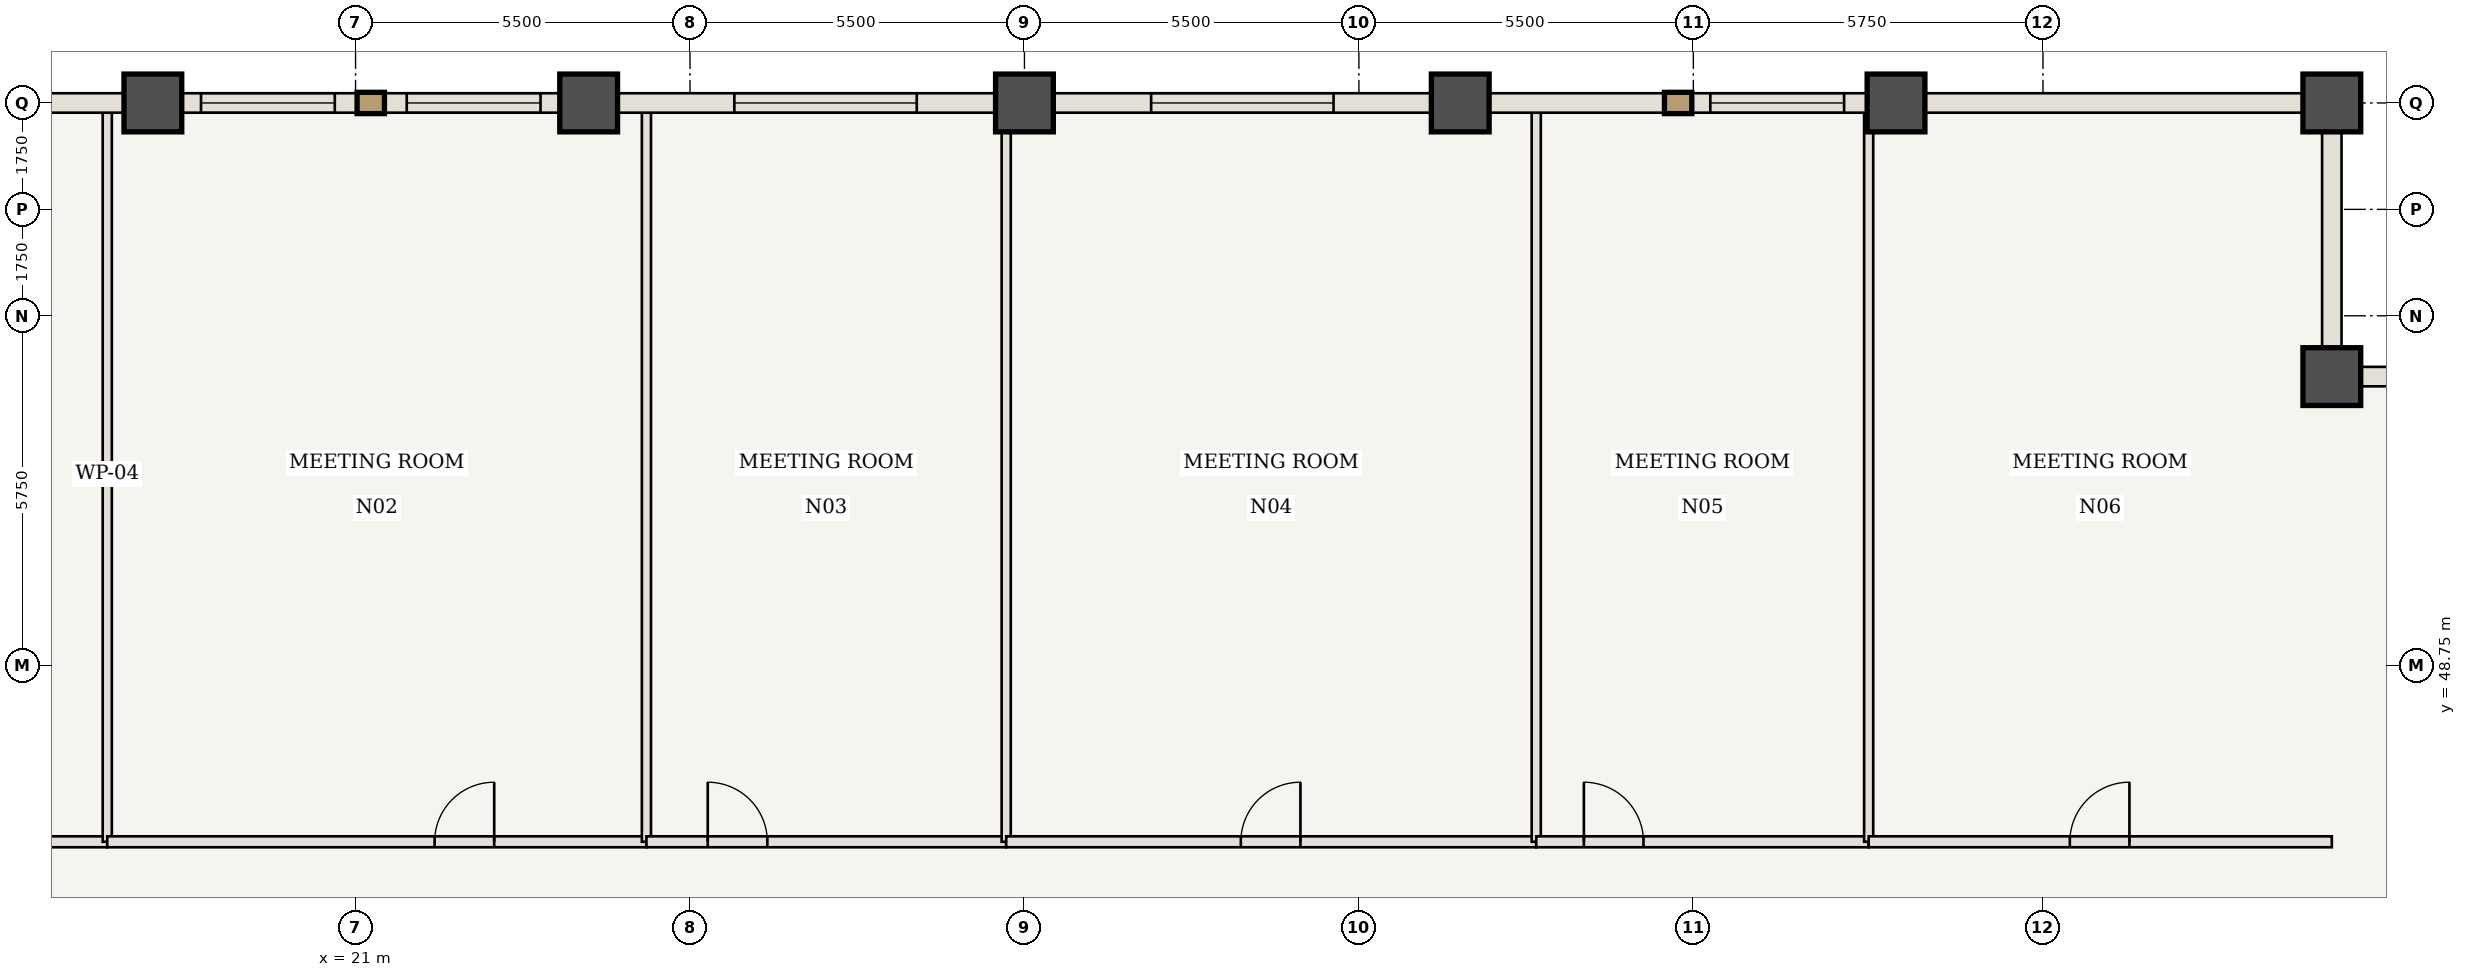
"""IFC4 building model, lengths in metres.
Left out: names, types, materials, properties, quantities, classifications, styles, units other than length and angle.
Written with IfcOpenShell. Run it as: python <this file> out.ifc"""

import sys

from ifc_helpers import new_model, si_unit, direction, frame, frame_2d, origin, origin_2d, place, context, subcontext, project, spatial, rectangle, extrude, element, fill, save


model = new_model("IFC4")
c1 = context("Model", 3, precision=1e-05, world=origin(), true_north=direction((0.0, 1.0)))
c2 = subcontext(c1, "Body", "Model", "MODEL_VIEW")
j1 = project(units=[si_unit("LENGTHUNIT", "METRE"), si_unit("PLANEANGLEUNIT", "RADIAN")], contexts=[c1])
p1 = place(None, origin())
s1 = spatial("IfcSite", under=j1, at=p1, CompositionType="ELEMENT")
p2 = place(p1, origin())
s2 = spatial("IfcBuilding", under=s1, at=p2, CompositionType="ELEMENT")
p3 = place(p2, frame((0.0, 0.0, 172.2)))
s3 = spatial("IfcBuildingStorey", under=s2, at=p3, CompositionType="ELEMENT", Elevation=172.2)
for number, where, z_axis, x_axis in (
    (1, (53.5, 53.5, 0.0), (0.0, 0.0, 1.0), (1.0, 0.0, 0.0)),
    (2, (53.5, 58.0, 0.0), (0.0, 0.0, 1.0), (1.0, 0.0, 0.0)),
    (3, (17.667, 58.0, 0.0), (0.0, 0.0, 1.0), (1.0, 0.0, 0.0)),
    (4, (24.833, 58.0, 0.0), (0.0, 0.0, 1.0), (1.0, 0.0, 0.0)),
    (5, (32.0, 58.0, 0.0), (0.0, 0.0, 1.0), (1.0, 0.0, 0.0)),
    (6, (39.167, 58.0, 0.0), (0.0, 0.0, 1.0), (1.0, 0.0, 0.0)),
    (7, (46.333, 58.0, 0.0), (0.0, 0.0, 1.0), (1.0, 0.0, 0.0)),
):
    element("IfcColumn", number, at=place(p3, frame(where, z_axis=z_axis, x_axis=x_axis)), inside=s3, PredefinedType="COLUMN", context=c2, shape_type="SweptSolid", body=[
        extrude(rectangle(XDim=0.95, YDim=0.95, at=origin_2d()), origin(), (0.0, 0.0, 1.0), 3.85),
    ])
p4 = place(p3, frame((10.5, 45.85, 0.0), z_axis=(0.0, 0.0, 1.0), x_axis=(1.0, 0.0, 0.0)))
e8 = element("IfcWall", 8, at=p4, inside=s3, PredefinedType="STANDARD", context=c2, shape_type="SweptSolid", body=[
    extrude(rectangle(XDim=6.417, YDim=0.18, at=frame_2d((3.208, 0.0))), origin(), (0.0, 0.0, 1.0), 3.43),
])
p5 = place(p4, frame((2.708, 0.0, 0.0)))
e9 = element("IfcOpeningElement", 9, at=p5, cuts=e8, PredefinedType="OPENING", context=c2, shape_type="SweptSolid", body=[
    extrude(rectangle(XDim=0.98, YDim=2.2, at=frame_2d((0.49, 1.1))), frame((0.0, 0.1, 0.0), z_axis=(0.0, -1.0, 0.0), x_axis=(1.0, 0.0, 0.0)), (0.0, 0.0, 1.0), 0.2),
])
p6 = place(p3, frame((16.917, 45.85, 0.0), z_axis=(0.0, 0.0, 1.0), x_axis=(0.0, 1.0, 0.0)))
e10 = element("IfcWall", 10, at=p6, inside=s3, PredefinedType="STANDARD", context=c2, shape_type="SweptSolid", body=[
    extrude(rectangle(XDim=12.09, YDim=0.15, at=frame_2d((6.045, 0.0))), origin(), (0.0, 0.0, 1.0), 3.43),
])
p7 = place(p3, frame((16.917, 45.85, 0.0), z_axis=(0.0, 0.0, 1.0), x_axis=(1.0, 0.0, 0.0)))
e11 = element("IfcWall", 11, at=p7, inside=s3, PredefinedType="STANDARD", context=c2, shape_type="SweptSolid", body=[
    extrude(rectangle(XDim=8.866, YDim=0.18, at=frame_2d((4.433, 0.0))), origin(), (0.0, 0.0, 1.0), 3.43),
])
p8 = place(p7, frame((5.383, 0.0, 0.0)))
e12 = element("IfcOpeningElement", 12, at=p8, cuts=e11, PredefinedType="OPENING", context=c2, shape_type="SweptSolid", body=[
    extrude(rectangle(XDim=0.98, YDim=2.2, at=frame_2d((0.49, 1.1))), frame((0.0, 0.1, 0.0), z_axis=(0.0, -1.0, 0.0), x_axis=(1.0, 0.0, 0.0)), (0.0, 0.0, 1.0), 0.2),
])
p9 = place(p3, frame((25.783, 45.85, 0.0), z_axis=(0.0, 0.0, 1.0), x_axis=(0.0, 1.0, 0.0)))
e13 = element("IfcWall", 13, at=p9, inside=s3, PredefinedType="STANDARD", context=c2, shape_type="SweptSolid", body=[
    extrude(rectangle(XDim=12.09, YDim=0.15, at=frame_2d((6.045, 0.0))), origin(), (0.0, 0.0, 1.0), 3.43),
])
p10 = place(p3, frame((25.783, 45.85, 0.0), z_axis=(0.0, 0.0, 1.0), x_axis=(1.0, 0.0, 0.0)))
e14 = element("IfcWall", 14, at=p10, inside=s3, PredefinedType="STANDARD", context=c2, shape_type="SweptSolid", body=[
    extrude(rectangle(XDim=5.917, YDim=0.18, at=frame_2d((2.958, 0.0))), origin(), (0.0, 0.0, 1.0), 3.43),
])
p11 = place(p10, frame((1.008, 0.0, 0.0)))
e15 = element("IfcOpeningElement", 15, at=p11, cuts=e14, PredefinedType="OPENING", context=c2, shape_type="SweptSolid", body=[
    extrude(rectangle(XDim=0.98, YDim=2.2, at=frame_2d((0.49, 1.1))), frame((0.0, 0.1, 0.0), z_axis=(0.0, -1.0, 0.0), x_axis=(1.0, 0.0, 0.0)), (0.0, 0.0, 1.0), 0.2),
])
p12 = place(p3, frame((31.7, 45.85, 0.0), z_axis=(0.0, 0.0, 1.0), x_axis=(0.0, 1.0, 0.0)))
e16 = element("IfcWall", 16, at=p12, inside=s3, PredefinedType="STANDARD", context=c2, shape_type="SweptSolid", body=[
    extrude(rectangle(XDim=12.09, YDim=0.15, at=frame_2d((6.045, 0.0))), origin(), (0.0, 0.0, 1.0), 3.43),
])
p13 = place(p3, frame((31.7, 45.85, 0.0), z_axis=(0.0, 0.0, 1.0), x_axis=(1.0, 0.0, 0.0)))
e17 = element("IfcWall", 17, at=p13, inside=s3, PredefinedType="STANDARD", context=c2, shape_type="SweptSolid", body=[
    extrude(rectangle(XDim=8.717, YDim=0.18, at=frame_2d((4.358, 0.0))), origin(), (0.0, 0.0, 1.0), 3.43),
])
p14 = place(p13, frame((3.858, 0.0, 0.0)))
e18 = element("IfcOpeningElement", 18, at=p14, cuts=e17, PredefinedType="OPENING", context=c2, shape_type="SweptSolid", body=[
    extrude(rectangle(XDim=0.98, YDim=2.2, at=frame_2d((0.49, 1.1))), frame((0.0, 0.1, 0.0), z_axis=(0.0, -1.0, 0.0), x_axis=(1.0, 0.0, 0.0)), (0.0, 0.0, 1.0), 0.2),
])
p15 = place(p3, frame((40.417, 45.85, 0.0), z_axis=(0.0, 0.0, 1.0), x_axis=(0.0, 1.0, 0.0)))
e19 = element("IfcWall", 19, at=p15, inside=s3, PredefinedType="STANDARD", context=c2, shape_type="SweptSolid", body=[
    extrude(rectangle(XDim=12.09, YDim=0.15, at=frame_2d((6.045, 0.0))), origin(), (0.0, 0.0, 1.0), 3.43),
])
p16 = place(p3, frame((40.417, 45.85, 0.0), z_axis=(0.0, 0.0, 1.0), x_axis=(1.0, 0.0, 0.0)))
e20 = element("IfcWall", 20, at=p16, inside=s3, PredefinedType="STANDARD", context=c2, shape_type="SweptSolid", body=[
    extrude(rectangle(XDim=5.467, YDim=0.18, at=frame_2d((2.733, 0.0))), origin(), (0.0, 0.0, 1.0), 3.43),
])
p17 = place(p16, frame((0.783, 0.0, 0.0)))
e21 = element("IfcOpeningElement", 21, at=p17, cuts=e20, PredefinedType="OPENING", context=c2, shape_type="SweptSolid", body=[
    extrude(rectangle(XDim=0.98, YDim=2.2, at=frame_2d((0.49, 1.1))), frame((0.0, 0.1, 0.0), z_axis=(0.0, -1.0, 0.0), x_axis=(1.0, 0.0, 0.0)), (0.0, 0.0, 1.0), 0.2),
])
p18 = place(p3, frame((45.883, 45.85, 0.0), z_axis=(0.0, 0.0, 1.0), x_axis=(0.0, 1.0, 0.0)))
e22 = element("IfcWall", 22, at=p18, inside=s3, PredefinedType="STANDARD", context=c2, shape_type="SweptSolid", body=[
    extrude(rectangle(XDim=12.09, YDim=0.15, at=frame_2d((6.045, 0.0))), origin(), (0.0, 0.0, 1.0), 3.43),
])
p19 = place(p3, frame((45.883, 45.85, 0.0), z_axis=(0.0, 0.0, 1.0), x_axis=(1.0, 0.0, 0.0)))
e23 = element("IfcWall", 23, at=p19, inside=s3, PredefinedType="STANDARD", context=c2, shape_type="SweptSolid", body=[
    extrude(rectangle(XDim=7.617, YDim=0.18, at=frame_2d((3.808, 0.0))), origin(), (0.0, 0.0, 1.0), 3.43),
])
p20 = place(p19, frame((3.308, 0.0, 0.0)))
e24 = element("IfcOpeningElement", 24, at=p20, cuts=e23, PredefinedType="OPENING", context=c2, shape_type="SweptSolid", body=[
    extrude(rectangle(XDim=0.98, YDim=2.2, at=frame_2d((0.49, 1.1))), frame((0.0, 0.1, 0.0), z_axis=(0.0, -1.0, 0.0), x_axis=(1.0, 0.0, 0.0)), (0.0, 0.0, 1.0), 0.2),
])
p21 = place(p3, frame((10.5, 58.0, 0.0), z_axis=(0.0, 0.0, 1.0), x_axis=(1.0, 0.0, 0.0)))
e25 = element("IfcWall", 25, at=p21, inside=s3, PredefinedType="USERDEFINED", context=c2, shape_type="SweptSolid", body=[
    extrude(rectangle(XDim=7.167, YDim=0.32, at=frame_2d((3.583, 0.0))), origin(), (0.0, 0.0, 1.0), 2.63),
])
p22 = place(p3, frame((17.667, 58.0, 0.0), z_axis=(0.0, 0.0, 1.0), x_axis=(1.0, 0.0, 0.0)))
e26 = element("IfcWall", 26, at=p22, inside=s3, PredefinedType="USERDEFINED", context=c2, shape_type="SweptSolid", body=[
    extrude(rectangle(XDim=7.167, YDim=0.32, at=frame_2d((3.583, 0.0))), origin(), (0.0, 0.0, 1.0), 2.63),
])
p23 = place(p22, frame((0.792, 0.0, 0.85)))
e27 = element("IfcOpeningElement", 27, at=p23, cuts=e26, PredefinedType="OPENING", context=c2, shape_type="SweptSolid", body=[
    extrude(rectangle(XDim=2.2, YDim=1.58, at=frame_2d((1.1, 0.79))), frame((0.0, 0.17, 0.0), z_axis=(0.0, -1.0, 0.0), x_axis=(1.0, 0.0, 0.0)), (0.0, 0.0, 1.0), 0.34),
])
p24 = place(p22, frame((4.175, 0.0, 0.85)))
e28 = element("IfcOpeningElement", 28, at=p24, cuts=e26, PredefinedType="OPENING", context=c2, shape_type="SweptSolid", body=[
    extrude(rectangle(XDim=2.2, YDim=1.58, at=frame_2d((1.1, 0.79))), frame((0.0, 0.17, 0.0), z_axis=(0.0, -1.0, 0.0), x_axis=(1.0, 0.0, 0.0)), (0.0, 0.0, 1.0), 0.34),
])
p25 = place(p3, frame((24.833, 58.0, 0.0), z_axis=(0.0, 0.0, 1.0), x_axis=(1.0, 0.0, 0.0)))
e29 = element("IfcWall", 29, at=p25, inside=s3, PredefinedType="USERDEFINED", context=c2, shape_type="SweptSolid", body=[
    extrude(rectangle(XDim=7.167, YDim=0.32, at=frame_2d((3.583, 0.0))), origin(), (0.0, 0.0, 1.0), 2.63),
])
p26 = place(p25, frame((2.396, 0.0, 0.85)))
e30 = element("IfcOpeningElement", 30, at=p26, cuts=e29, PredefinedType="OPENING", context=c2, shape_type="SweptSolid", body=[
    extrude(rectangle(XDim=3.0, YDim=1.58, at=frame_2d((1.5, 0.79))), frame((0.0, 0.17, 0.0), z_axis=(0.0, -1.0, 0.0), x_axis=(1.0, 0.0, 0.0)), (0.0, 0.0, 1.0), 0.34),
])
p27 = place(p3, frame((32.0, 58.0, 0.0), z_axis=(0.0, 0.0, 1.0), x_axis=(1.0, 0.0, 0.0)))
e31 = element("IfcWall", 31, at=p27, inside=s3, PredefinedType="USERDEFINED", context=c2, shape_type="SweptSolid", body=[
    extrude(rectangle(XDim=7.167, YDim=0.32, at=frame_2d((3.583, 0.0))), origin(), (0.0, 0.0, 1.0), 2.63),
])
p28 = place(p27, frame((2.083, 0.0, 0.85)))
e32 = element("IfcOpeningElement", 32, at=p28, cuts=e31, PredefinedType="OPENING", context=c2, shape_type="SweptSolid", body=[
    extrude(rectangle(XDim=3.0, YDim=1.58, at=frame_2d((1.5, 0.79))), frame((0.0, 0.17, 0.0), z_axis=(0.0, -1.0, 0.0), x_axis=(1.0, 0.0, 0.0)), (0.0, 0.0, 1.0), 0.34),
])
p29 = place(p3, frame((39.167, 58.0, 0.0), z_axis=(0.0, 0.0, 1.0), x_axis=(1.0, 0.0, 0.0)))
e33 = element("IfcWall", 33, at=p29, inside=s3, PredefinedType="USERDEFINED", context=c2, shape_type="SweptSolid", body=[
    extrude(rectangle(XDim=7.167, YDim=0.32, at=frame_2d((3.583, 0.0))), origin(), (0.0, 0.0, 1.0), 2.63),
])
p30 = place(p29, frame((4.113, 0.0, 0.85)))
e34 = element("IfcOpeningElement", 34, at=p30, cuts=e33, PredefinedType="OPENING", context=c2, shape_type="SweptSolid", body=[
    extrude(rectangle(XDim=2.2, YDim=1.58, at=frame_2d((1.1, 0.79))), frame((0.0, 0.17, 0.0), z_axis=(0.0, -1.0, 0.0), x_axis=(1.0, 0.0, 0.0)), (0.0, 0.0, 1.0), 0.34),
])
p31 = place(p3, frame((46.333, 58.0, 0.0), z_axis=(0.0, 0.0, 1.0), x_axis=(1.0, 0.0, 0.0)))
e35 = element("IfcWall", 35, at=p31, inside=s3, PredefinedType="USERDEFINED", context=c2, shape_type="SweptSolid", body=[
    extrude(rectangle(XDim=7.167, YDim=0.32, at=frame_2d((3.583, 0.0))), origin(), (0.0, 0.0, 1.0), 2.63),
])
for number, where, z_axis, x_axis in (
    (36, (53.5, 53.5, 0.0), (0.0, 0.0, 1.0), (1.0, 0.0, 0.0)),
    (37, (53.5, 58.0, 0.0), (0.0, 0.0, 1.0), (0.0, -1.0, 0.0)),
):
    element("IfcWall", number, at=place(p3, frame(where, z_axis=z_axis, x_axis=x_axis)), inside=s3, PredefinedType="USERDEFINED", context=c2, shape_type="SweptSolid", body=[
        extrude(rectangle(XDim=4.5, YDim=0.32, at=frame_2d((2.25, 0.0))), origin(), (0.0, 0.0, 1.0), 2.63),
    ])
p32 = place(p8, origin())
e38 = element("IfcDoor", 38, at=p32, inside=s3, OperationType="SINGLE_SWING_RIGHT", PredefinedType="DOOR", context=c2, shape_type="SweptSolid", body=[
    extrude(rectangle(XDim=0.98, YDim=2.2, at=frame_2d((0.49, 1.1))), frame((0.0, 0.025, 0.0), z_axis=(0.0, -1.0, 0.0), x_axis=(1.0, 0.0, 0.0)), (0.0, 0.0, 1.0), 0.05),
])
fill(e12, e38)
p33 = place(p11, origin())
e39 = element("IfcDoor", 39, at=p33, inside=s3, OperationType="SINGLE_SWING_LEFT", PredefinedType="DOOR", context=c2, shape_type="SweptSolid", body=[
    extrude(rectangle(XDim=0.98, YDim=2.2, at=frame_2d((0.49, 1.1))), frame((0.0, 0.025, 0.0), z_axis=(0.0, -1.0, 0.0), x_axis=(1.0, 0.0, 0.0)), (0.0, 0.0, 1.0), 0.05),
])
fill(e15, e39)
p34 = place(p14, origin())
e40 = element("IfcDoor", 40, at=p34, inside=s3, OperationType="SINGLE_SWING_RIGHT", PredefinedType="DOOR", context=c2, shape_type="SweptSolid", body=[
    extrude(rectangle(XDim=0.98, YDim=2.2, at=frame_2d((0.49, 1.1))), frame((0.0, 0.025, 0.0), z_axis=(0.0, -1.0, 0.0), x_axis=(1.0, 0.0, 0.0)), (0.0, 0.0, 1.0), 0.05),
])
fill(e18, e40)
p35 = place(p17, origin())
e41 = element("IfcDoor", 41, at=p35, inside=s3, OperationType="SINGLE_SWING_LEFT", PredefinedType="DOOR", context=c2, shape_type="SweptSolid", body=[
    extrude(rectangle(XDim=0.98, YDim=2.2, at=frame_2d((0.49, 1.1))), frame((0.0, 0.025, 0.0), z_axis=(0.0, -1.0, 0.0), x_axis=(1.0, 0.0, 0.0)), (0.0, 0.0, 1.0), 0.05),
])
fill(e21, e41)
p36 = place(p20, origin())
e42 = element("IfcDoor", 42, at=p36, inside=s3, OperationType="SINGLE_SWING_RIGHT", PredefinedType="DOOR", context=c2, shape_type="SweptSolid", body=[
    extrude(rectangle(XDim=0.98, YDim=2.2, at=frame_2d((0.49, 1.1))), frame((0.0, 0.025, 0.0), z_axis=(0.0, -1.0, 0.0), x_axis=(1.0, 0.0, 0.0)), (0.0, 0.0, 1.0), 0.05),
])
fill(e24, e42)
p37 = place(p23, origin())
e43 = element("IfcWindow", 43, at=p37, inside=s3, PartitioningType="SINGLE_PANEL", PredefinedType="WINDOW", context=c2, shape_type="SweptSolid", body=[
    extrude(rectangle(XDim=2.2, YDim=1.58, at=frame_2d((1.1, 0.79))), frame((0.0, 0.03, 0.0), z_axis=(0.0, -1.0, 0.0), x_axis=(1.0, 0.0, 0.0)), (0.0, 0.0, 1.0), 0.06),
])
fill(e27, e43)
p38 = place(p24, origin())
e44 = element("IfcWindow", 44, at=p38, inside=s3, PartitioningType="SINGLE_PANEL", PredefinedType="WINDOW", context=c2, shape_type="SweptSolid", body=[
    extrude(rectangle(XDim=2.2, YDim=1.58, at=frame_2d((1.1, 0.79))), frame((0.0, 0.03, 0.0), z_axis=(0.0, -1.0, 0.0), x_axis=(1.0, 0.0, 0.0)), (0.0, 0.0, 1.0), 0.06),
])
fill(e28, e44)
p39 = place(p26, origin())
e45 = element("IfcWindow", 45, at=p39, inside=s3, PartitioningType="SINGLE_PANEL", PredefinedType="WINDOW", context=c2, shape_type="SweptSolid", body=[
    extrude(rectangle(XDim=3.0, YDim=1.58, at=frame_2d((1.5, 0.79))), frame((0.0, 0.03, 0.0), z_axis=(0.0, -1.0, 0.0), x_axis=(1.0, 0.0, 0.0)), (0.0, 0.0, 1.0), 0.06),
])
fill(e30, e45)
p40 = place(p28, origin())
e46 = element("IfcWindow", 46, at=p40, inside=s3, PartitioningType="SINGLE_PANEL", PredefinedType="WINDOW", context=c2, shape_type="SweptSolid", body=[
    extrude(rectangle(XDim=3.0, YDim=1.58, at=frame_2d((1.5, 0.79))), frame((0.0, 0.03, 0.0), z_axis=(0.0, -1.0, 0.0), x_axis=(1.0, 0.0, 0.0)), (0.0, 0.0, 1.0), 0.06),
])
fill(e32, e46)
p41 = place(p30, origin())
e47 = element("IfcWindow", 47, at=p41, inside=s3, PartitioningType="SINGLE_PANEL", PredefinedType="WINDOW", context=c2, shape_type="SweptSolid", body=[
    extrude(rectangle(XDim=2.2, YDim=1.58, at=frame_2d((1.1, 0.79))), frame((0.0, 0.03, 0.0), z_axis=(0.0, -1.0, 0.0), x_axis=(1.0, 0.0, 0.0)), (0.0, 0.0, 1.0), 0.06),
])
fill(e34, e47)
save(model, sys.argv[1])
